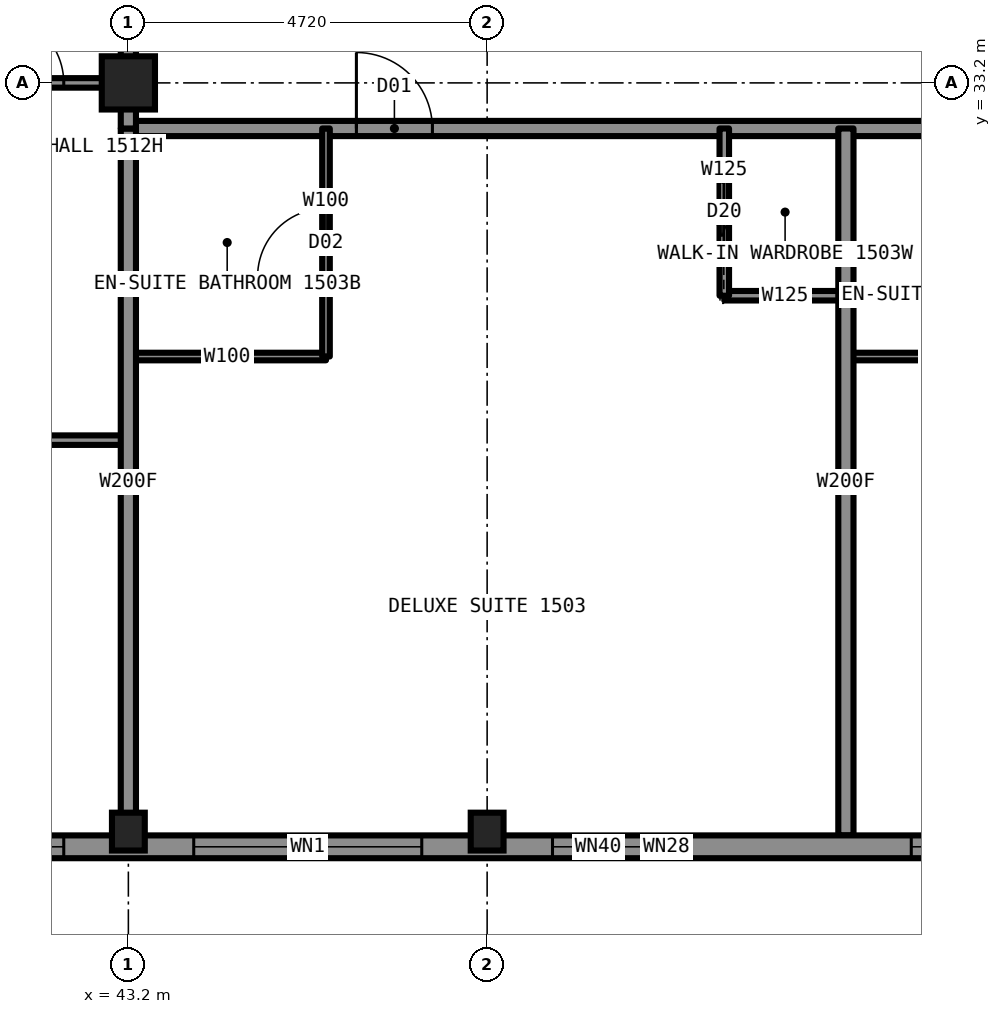
"""IFC4 building model, lengths in metres.
Left out: names, types, materials, properties, quantities, classifications, styles, units other than length and angle.
Written with IfcOpenShell. Run it as: python <this file> out.ifc"""

import sys

from ifc_helpers import new_model, si_unit, direction, frame, frame_2d, origin, origin_2d, place, context, subcontext, project, spatial, rectangle, hollow_rectangle, i_section, extrude, element, fill, save


model = new_model("IFC4")
c1 = context("Model", 3, precision=1e-05, world=origin(), true_north=direction((0.0, 1.0)))
c2 = subcontext(c1, "Body", "Model", "MODEL_VIEW")
j1 = project(units=[si_unit("LENGTHUNIT", "METRE"), si_unit("PLANEANGLEUNIT", "RADIAN")], contexts=[c1])
p1 = place(None, origin())
s1 = spatial("IfcSite", under=j1, at=p1, CompositionType="ELEMENT")
p2 = place(p1, origin())
s2 = spatial("IfcBuilding", under=s1, at=p2, CompositionType="ELEMENT")
p3 = place(p2, frame((0.0, 0.0, 60.0)))
s3 = spatial("IfcBuildingStorey", under=s2, at=p3, CompositionType="ELEMENT", Elevation=60.0)
for number, where, z_axis, x_axis in (
    (1, (43.2, 23.35, 0.0), (0.0, 0.0, 1.0), (1.0, 0.0, 0.0)),
    (2, (47.92, 23.35, 0.0), (0.0, 0.0, 1.0), (1.0, 0.0, 0.0)),
):
    element("IfcColumn", number, at=place(p3, frame(where, z_axis=z_axis, x_axis=x_axis)), inside=s3, PredefinedType="COLUMN", context=c2, shape_type="SweptSolid", body=[
        extrude(i_section(OverallWidth=0.432, OverallDepth=0.498, WebThickness=0.056, FlangeThickness=0.089, at=origin_2d()), origin(), (0.0, 0.0, 1.0), 3.5),
    ])
p4 = place(p3, frame((43.2, 33.2, 0.0), z_axis=(0.0, 0.0, 1.0), x_axis=(1.0, 0.0, 0.0)))
e3 = element("IfcColumn", 3, at=p4, inside=s3, PredefinedType="COLUMN", context=c2, shape_type="SweptSolid", body=[
    extrude(hollow_rectangle(XDim=0.7, YDim=0.7, WallThickness=0.06, at=origin_2d()), origin(), (0.0, 0.0, 1.0), 3.5),
])
p5 = place(p3, frame((33.3, 33.2, 0.0), z_axis=(0.0, 0.0, 1.0), x_axis=(1.0, 0.0, 0.0)))
e4 = element("IfcWall", 4, at=p5, inside=s3, PredefinedType="PARTITIONING", context=c2, shape_type="SweptSolid", body=[
    extrude(rectangle(XDim=9.9, YDim=0.125, at=frame_2d((4.95, 0.0))), origin(), (0.0, 0.0, 1.0), 2.573),
])
p6 = place(p5, frame((8.15, 0.0, 0.0)))
e5 = element("IfcOpeningElement", 5, at=p6, cuts=e4, PredefinedType="OPENING", context=c2, shape_type="SweptSolid", body=[
    extrude(rectangle(XDim=0.9, YDim=2.2, at=frame_2d((0.45, 1.1))), frame((0.0, 0.073, 0.0), z_axis=(0.0, -1.0, 0.0), x_axis=(1.0, 0.0, 0.0)), (0.0, 0.0, 1.0), 0.145),
])
p7 = place(p3, frame((43.2, 32.6, 0.0), z_axis=(0.0, 0.0, 1.0), x_axis=(1.0, 0.0, 0.0)))
e6 = element("IfcWall", 6, at=p7, inside=s3, PredefinedType="PARTITIONING", context=c2, shape_type="SweptSolid", body=[
    extrude(rectangle(XDim=23.6, YDim=0.2, at=frame_2d((11.8, 0.0))), origin(), (0.0, 0.0, 1.0), 3.33),
])
p8 = place(p7, frame((3.0, 0.0, 0.0)))
e7 = element("IfcOpeningElement", 7, at=p8, cuts=e6, PredefinedType="OPENING", context=c2, shape_type="SweptSolid", body=[
    extrude(rectangle(XDim=1.0, YDim=2.2, at=frame_2d((0.5, 1.1))), frame((0.0, 0.11, 0.0), z_axis=(0.0, -1.0, 0.0), x_axis=(1.0, 0.0, 0.0)), (0.0, 0.0, 1.0), 0.22),
])
p9 = place(p7, frame((12.44, 0.0, 0.0)))
e8 = element("IfcOpeningElement", 8, at=p9, cuts=e6, PredefinedType="OPENING", context=c2, shape_type="SweptSolid", body=[
    extrude(rectangle(XDim=1.0, YDim=2.2, at=frame_2d((0.5, 1.1))), frame((0.0, 0.11, 0.0), z_axis=(0.0, -1.0, 0.0), x_axis=(1.0, 0.0, 0.0)), (0.0, 0.0, 1.0), 0.22),
])
p10 = place(p7, frame((20.34, 0.0, 0.0)))
e9 = element("IfcOpeningElement", 9, at=p10, cuts=e6, PredefinedType="OPENING", context=c2, shape_type="SweptSolid", body=[
    extrude(rectangle(XDim=1.0, YDim=2.2, at=frame_2d((0.5, 1.1))), frame((0.0, 0.11, 0.0), z_axis=(0.0, -1.0, 0.0), x_axis=(1.0, 0.0, 0.0)), (0.0, 0.0, 1.0), 0.22),
])
p11 = place(p3, frame((51.04, 30.4, 0.0), z_axis=(0.0, 0.0, 1.0), x_axis=(1.0, 0.0, 0.0)))
e10 = element("IfcWall", 10, at=p11, inside=s3, PredefinedType="PARTITIONING", context=c2, shape_type="SweptSolid", body=[
    extrude(rectangle(XDim=1.6, YDim=0.125, at=frame_2d((0.8, 0.0))), origin(), (0.0, 0.0, 1.0), 3.33),
])
for number, where, z_axis, x_axis in (
    (11, (43.2, 29.6, 0.0), (0.0, 0.0, 1.0), (1.0, 0.0, 0.0)),
    (12, (52.64, 29.6, 0.0), (0.0, 0.0, 1.0), (1.0, 0.0, 0.0)),
):
    element("IfcWall", number, at=place(p3, frame(where, z_axis=z_axis, x_axis=x_axis)), inside=s3, PredefinedType="PARTITIONING", context=c2, shape_type="SweptSolid", body=[
        extrude(rectangle(XDim=2.6, YDim=0.1, at=frame_2d((1.3, 0.0))), origin(), (0.0, 0.0, 1.0), 3.33),
    ])
p12 = place(p3, frame((33.306, 28.5, 0.0), z_axis=(0.0, 0.0, 1.0), x_axis=(1.0, 0.0, 0.0)))
e13 = element("IfcWall", 13, at=p12, inside=s3, PredefinedType="PARTITIONING", context=c2, shape_type="SweptSolid", body=[
    extrude(rectangle(XDim=9.894, YDim=0.125, at=frame_2d((4.947, 0.0))), origin(), (0.0, 0.0, 1.0), 3.33),
])
p13 = place(p12, frame((7.244, 0.0, 0.0)))
e14 = element("IfcOpeningElement", 14, at=p13, cuts=e13, PredefinedType="OPENING", context=c2, shape_type="SweptSolid", body=[
    extrude(rectangle(XDim=0.9, YDim=2.2, at=frame_2d((0.45, 1.1))), frame((0.0, 0.073, 0.0), z_axis=(0.0, -1.0, 0.0), x_axis=(1.0, 0.0, 0.0)), (0.0, 0.0, 1.0), 0.145),
])
p14 = place(p3, frame((43.2, 33.22, 0.0), z_axis=(0.0, 0.0, 1.0), x_axis=(0.0, 1.0, 0.0)))
e15 = element("IfcWall", 15, at=p14, inside=s3, PredefinedType="PARTITIONING", context=c2, shape_type="SweptSolid", body=[
    extrude(rectangle(XDim=23.58, YDim=0.2, at=frame_2d((11.79, 0.0))), origin(), (0.0, 0.0, 1.0), 3.33),
])
p15 = place(p14, frame((7.7, 0.0, 0.0)))
e16 = element("IfcOpeningElement", 16, at=p15, cuts=e15, PredefinedType="OPENING", context=c2, shape_type="SweptSolid", body=[
    extrude(rectangle(XDim=1.0, YDim=2.2, at=frame_2d((0.5, 1.1))), frame((0.0, 0.11, 0.0), z_axis=(0.0, -1.0, 0.0), x_axis=(1.0, 0.0, 0.0)), (0.0, 0.0, 1.0), 0.22),
])
p16 = place(p14, frame((16.4, 0.0, 0.0)))
e17 = element("IfcOpeningElement", 17, at=p16, cuts=e15, PredefinedType="OPENING", context=c2, shape_type="SweptSolid", body=[
    extrude(rectangle(XDim=1.0, YDim=2.2, at=frame_2d((0.5, 1.1))), frame((0.0, 0.11, 0.0), z_axis=(0.0, -1.0, 0.0), x_axis=(1.0, 0.0, 0.0)), (0.0, 0.0, 1.0), 0.22),
])
p17 = place(p14, frame((21.82, 0.0, 0.0)))
e18 = element("IfcOpeningElement", 18, at=p17, cuts=e15, PredefinedType="OPENING", context=c2, shape_type="SweptSolid", body=[
    extrude(rectangle(XDim=1.1, YDim=2.2, at=frame_2d((0.55, 1.1))), frame((0.0, 0.11, 0.0), z_axis=(0.0, -1.0, 0.0), x_axis=(1.0, 0.0, 0.0)), (0.0, 0.0, 1.0), 0.22),
])
p18 = place(p14, frame((0.64, 0.0, 0.0)))
e19 = element("IfcOpeningElement", 19, at=p18, cuts=e15, PredefinedType="OPENING", context=c2, shape_type="SweptSolid", body=[
    extrude(rectangle(XDim=1.1, YDim=2.2, at=frame_2d((0.55, 1.1))), frame((0.0, 0.11, 0.0), z_axis=(0.0, -1.0, 0.0), x_axis=(1.0, 0.0, 0.0)), (0.0, 0.0, 1.0), 0.22),
])
p19 = place(p3, frame((43.2, 23.3, 0.0), z_axis=(0.0, 0.0, 1.0), x_axis=(0.0, 1.0, 0.0)))
e20 = element("IfcWall", 20, at=p19, inside=s3, PredefinedType="PARTITIONING", context=c2, shape_type="SweptSolid", body=[
    extrude(rectangle(XDim=9.3, YDim=0.2, at=frame_2d((4.65, 0.0))), origin(), (0.0, 0.0, 1.0), 2.573),
])
p20 = place(p3, frame((52.64, 23.3, 0.0), z_axis=(0.0, 0.0, 1.0), x_axis=(0.0, 1.0, 0.0)))
e21 = element("IfcWall", 21, at=p20, inside=s3, PredefinedType="PARTITIONING", context=c2, shape_type="SweptSolid", body=[
    extrude(rectangle(XDim=9.3, YDim=0.2, at=frame_2d((4.65, 0.0))), origin(), (0.0, 0.0, 1.0), 3.33),
])
p21 = place(p3, frame((51.04, 30.4, 0.0), z_axis=(0.0, 0.0, 1.0), x_axis=(0.0, 1.0, 0.0)))
e22 = element("IfcWall", 22, at=p21, inside=s3, PredefinedType="PARTITIONING", context=c2, shape_type="SweptSolid", body=[
    extrude(rectangle(XDim=2.2, YDim=0.125, at=frame_2d((1.1, 0.0))), origin(), (0.0, 0.0, 1.0), 3.33),
])
p22 = place(p21, frame((0.7, 0.0, 0.0)))
e23 = element("IfcOpeningElement", 23, at=p22, cuts=e22, PredefinedType="OPENING", context=c2, shape_type="SweptSolid", body=[
    extrude(rectangle(XDim=0.8, YDim=2.1, at=frame_2d((0.4, 1.05))), frame((0.0, 0.073, 0.0), z_axis=(0.0, -1.0, 0.0), x_axis=(1.0, 0.0, 0.0)), (0.0, 0.0, 1.0), 0.145),
])
p23 = place(p3, frame((45.8, 29.6, 0.0), z_axis=(0.0, 0.0, 1.0), x_axis=(0.0, 1.0, 0.0)))
e24 = element("IfcWall", 24, at=p23, inside=s3, PredefinedType="PARTITIONING", context=c2, shape_type="SweptSolid", body=[
    extrude(rectangle(XDim=3.0, YDim=0.1, at=frame_2d((1.5, 0.0))), origin(), (0.0, 0.0, 1.0), 3.33),
])
p24 = place(p23, frame((1.05, 0.0, 0.0)))
e25 = element("IfcOpeningElement", 25, at=p24, cuts=e24, PredefinedType="OPENING", context=c2, shape_type="SweptSolid", body=[
    extrude(rectangle(XDim=0.9, YDim=2.1, at=frame_2d((0.45, 1.05))), frame((0.0, 0.06, 0.0), z_axis=(0.0, -1.0, 0.0), x_axis=(1.0, 0.0, 0.0)), (0.0, 0.0, 1.0), 0.12),
])
p25 = place(p3, frame((38.5, 23.15, 0.0), z_axis=(0.0, 0.0, 1.0), x_axis=(1.0, 0.0, 0.0)))
e26 = element("IfcWall", 26, at=p25, inside=s3, PredefinedType="SOLIDWALL", context=c2, shape_type="SweptSolid", body=[
    extrude(rectangle(XDim=33.0, YDim=0.3, at=frame_2d((16.5, 0.0))), origin(), (0.0, 0.0, 1.0), 2.83),
])
p26 = place(p25, frame((0.85, 0.0, 0.5)))
e27 = element("IfcOpeningElement", 27, at=p26, cuts=e26, PredefinedType="OPENING", context=c2, shape_type="SweptSolid", body=[
    extrude(rectangle(XDim=3.0, YDim=2.0, at=frame_2d((1.5, 1.0))), frame((0.0, 0.16, 0.0), z_axis=(0.0, -1.0, 0.0), x_axis=(1.0, 0.0, 0.0)), (0.0, 0.0, 1.0), 0.32),
])
p27 = place(p25, frame((5.56, 0.0, 0.5)))
e28 = element("IfcOpeningElement", 28, at=p27, cuts=e26, PredefinedType="OPENING", context=c2, shape_type="SweptSolid", body=[
    extrude(rectangle(XDim=3.0, YDim=2.0, at=frame_2d((1.5, 1.0))), frame((0.0, 0.16, 0.0), z_axis=(0.0, -1.0, 0.0), x_axis=(1.0, 0.0, 0.0)), (0.0, 0.0, 1.0), 0.32),
])
p28 = place(p25, frame((10.28, 0.0, 0.5)))
e29 = element("IfcOpeningElement", 29, at=p28, cuts=e26, PredefinedType="OPENING", context=c2, shape_type="SweptSolid", body=[
    extrude(rectangle(XDim=1.2, YDim=1.7, at=frame_2d((0.6, 0.85))), frame((0.0, 0.16, 0.0), z_axis=(0.0, -1.0, 0.0), x_axis=(1.0, 0.0, 0.0)), (0.0, 0.0, 1.0), 0.32),
])
p29 = place(p25, frame((15.0, 0.0, 0.5)))
e30 = element("IfcOpeningElement", 30, at=p29, cuts=e26, PredefinedType="OPENING", context=c2, shape_type="SweptSolid", body=[
    extrude(rectangle(XDim=3.0, YDim=2.0, at=frame_2d((1.5, 1.0))), frame((0.0, 0.16, 0.0), z_axis=(0.0, -1.0, 0.0), x_axis=(1.0, 0.0, 0.0)), (0.0, 0.0, 1.0), 0.32),
])
p30 = place(p25, frame((21.52, 0.0, 0.5)))
e31 = element("IfcOpeningElement", 31, at=p30, cuts=e26, PredefinedType="OPENING", context=c2, shape_type="SweptSolid", body=[
    extrude(rectangle(XDim=1.2, YDim=1.7, at=frame_2d((0.6, 0.85))), frame((0.0, 0.16, 0.0), z_axis=(0.0, -1.0, 0.0), x_axis=(1.0, 0.0, 0.0)), (0.0, 0.0, 1.0), 0.32),
])
p31 = place(p25, frame((24.44, 0.0, 0.5)))
e32 = element("IfcOpeningElement", 32, at=p31, cuts=e26, PredefinedType="OPENING", context=c2, shape_type="SweptSolid", body=[
    extrude(rectangle(XDim=3.0, YDim=2.0, at=frame_2d((1.5, 1.0))), frame((0.0, 0.16, 0.0), z_axis=(0.0, -1.0, 0.0), x_axis=(1.0, 0.0, 0.0)), (0.0, 0.0, 1.0), 0.32),
])
p32 = place(p25, frame((29.15, 0.0, 0.5)))
e33 = element("IfcOpeningElement", 33, at=p32, cuts=e26, PredefinedType="OPENING", context=c2, shape_type="SweptSolid", body=[
    extrude(rectangle(XDim=3.0, YDim=2.0, at=frame_2d((1.5, 1.0))), frame((0.0, 0.16, 0.0), z_axis=(0.0, -1.0, 0.0), x_axis=(1.0, 0.0, 0.0)), (0.0, 0.0, 1.0), 0.32),
])
p33 = place(p25, frame((11.48, 0.0, 0.5)))
e34 = element("IfcOpeningElement", 34, at=p33, cuts=e26, PredefinedType="OPENING", context=c2, shape_type="SweptSolid", body=[
    extrude(rectangle(XDim=0.6, YDim=0.8, at=frame_2d((0.3, 0.4))), frame((0.0, 0.16, 0.0), z_axis=(0.0, -1.0, 0.0), x_axis=(1.0, 0.0, 0.0)), (0.0, 0.0, 1.0), 0.32),
])
p34 = place(p25, frame((20.87, 0.0, 0.5)))
e35 = element("IfcOpeningElement", 35, at=p34, cuts=e26, PredefinedType="OPENING", context=c2, shape_type="SweptSolid", body=[
    extrude(rectangle(XDim=0.6, YDim=0.8, at=frame_2d((0.3, 0.4))), frame((0.0, 0.16, 0.0), z_axis=(0.0, -1.0, 0.0), x_axis=(1.0, 0.0, 0.0)), (0.0, 0.0, 1.0), 0.32),
])
p35 = place(p3, frame((43.2, 32.6, 0.0), z_axis=(0.0, 0.0, 1.0), x_axis=(0.0, 1.0, 0.0)))
e36 = element("IfcWall", 36, at=p35, inside=s3, PredefinedType="PARTITIONING", context=c2, shape_type="SweptSolid", body=[
    extrude(rectangle(XDim=0.62, YDim=0.2, at=frame_2d((0.31, 0.0))), origin(), (0.0, 0.0, 1.0), 2.573),
])
p36 = place(p8, origin())
e37 = element("IfcDoor", 37, at=p36, inside=s3, OperationType="SINGLE_SWING_LEFT", PredefinedType="DOOR", context=c2, shape_type="SweptSolid", body=[
    extrude(rectangle(XDim=1.0, YDim=2.2, at=frame_2d((0.5, 1.1))), frame((0.0, 0.025, 0.0), z_axis=(0.0, -1.0, 0.0), x_axis=(1.0, 0.0, 0.0)), (0.0, 0.0, 1.0), 0.05),
])
fill(e7, e37)
p37 = place(p24, origin())
e38 = element("IfcDoor", 38, at=p37, inside=s3, OperationType="SINGLE_SWING_RIGHT", PredefinedType="DOOR", context=c2, shape_type="SweptSolid", body=[
    extrude(rectangle(XDim=0.9, YDim=2.1, at=frame_2d((0.45, 1.05))), frame((0.0, 0.025, 0.0), z_axis=(0.0, -1.0, 0.0), x_axis=(1.0, 0.0, 0.0)), (0.0, 0.0, 1.0), 0.05),
])
fill(e25, e38)
p38 = place(p22, origin())
e39 = element("IfcDoor", 39, at=p38, inside=s3, OperationType="SLIDING_TO_LEFT", PredefinedType="DOOR", context=c2, shape_type="SweptSolid", body=[
    extrude(rectangle(XDim=0.8, YDim=2.1, at=frame_2d((0.4, 1.05))), frame((0.0, 0.025, 0.0), z_axis=(0.0, -1.0, 0.0), x_axis=(1.0, 0.0, 0.0)), (0.0, 0.0, 1.0), 0.05),
])
fill(e23, e39)
p39 = place(p6, origin())
e40 = element("IfcDoor", 40, at=p39, inside=s3, OperationType="SINGLE_SWING_LEFT", PredefinedType="DOOR", context=c2, shape_type="SweptSolid", body=[
    extrude(rectangle(XDim=0.9, YDim=2.2, at=frame_2d((0.45, 1.1))), frame((0.0, 0.025, 0.0), z_axis=(0.0, -1.0, 0.0), x_axis=(1.0, 0.0, 0.0)), (0.0, 0.0, 1.0), 0.05),
])
fill(e5, e40)
p40 = place(p26, origin())
e41 = element("IfcWindow", 41, at=p40, inside=s3, PartitioningType="SINGLE_PANEL", PredefinedType="WINDOW", context=c2, shape_type="SweptSolid", body=[
    extrude(rectangle(XDim=3.0, YDim=2.0, at=frame_2d((1.5, 1.0))), frame((0.0, 0.03, 0.0), z_axis=(0.0, -1.0, 0.0), x_axis=(1.0, 0.0, 0.0)), (0.0, 0.0, 1.0), 0.06),
])
fill(e27, e41)
p41 = place(p27, origin())
e42 = element("IfcWindow", 42, at=p41, inside=s3, PartitioningType="SINGLE_PANEL", PredefinedType="WINDOW", context=c2, shape_type="SweptSolid", body=[
    extrude(rectangle(XDim=3.0, YDim=2.0, at=frame_2d((1.5, 1.0))), frame((0.0, 0.03, 0.0), z_axis=(0.0, -1.0, 0.0), x_axis=(1.0, 0.0, 0.0)), (0.0, 0.0, 1.0), 0.06),
])
fill(e28, e42)
p42 = place(p28, origin())
e43 = element("IfcWindow", 43, at=p42, inside=s3, PartitioningType="SINGLE_PANEL", PredefinedType="WINDOW", context=c2, shape_type="SweptSolid", body=[
    extrude(rectangle(XDim=1.2, YDim=1.7, at=frame_2d((0.6, 0.85))), frame((0.0, 0.03, 0.0), z_axis=(0.0, -1.0, 0.0), x_axis=(1.0, 0.0, 0.0)), (0.0, 0.0, 1.0), 0.06),
])
fill(e29, e43)
p43 = place(p29, origin())
e44 = element("IfcWindow", 44, at=p43, inside=s3, PartitioningType="SINGLE_PANEL", PredefinedType="WINDOW", context=c2, shape_type="SweptSolid", body=[
    extrude(rectangle(XDim=3.0, YDim=2.0, at=frame_2d((1.5, 1.0))), frame((0.0, 0.03, 0.0), z_axis=(0.0, -1.0, 0.0), x_axis=(1.0, 0.0, 0.0)), (0.0, 0.0, 1.0), 0.06),
])
fill(e30, e44)
p44 = place(p33, origin())
e45 = element("IfcWindow", 45, at=p44, inside=s3, PartitioningType="SINGLE_PANEL", PredefinedType="WINDOW", context=c2, shape_type="SweptSolid", body=[
    extrude(rectangle(XDim=0.6, YDim=0.8, at=frame_2d((0.3, 0.4))), frame((0.0, 0.03, 0.0), z_axis=(0.0, -1.0, 0.0), x_axis=(1.0, 0.0, 0.0)), (0.0, 0.0, 1.0), 0.06),
])
fill(e34, e45)
save(model, sys.argv[1])
